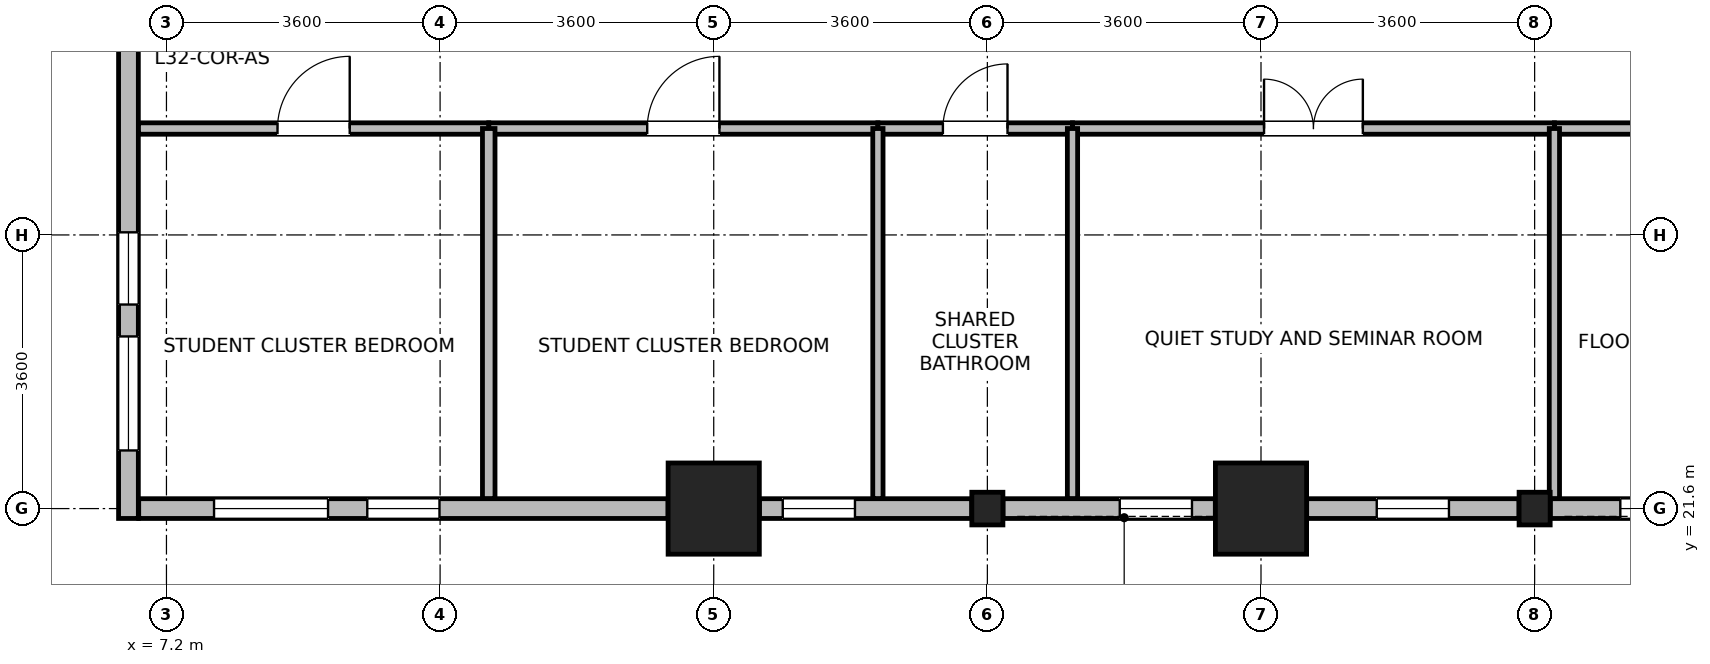
"""IFC4 building model, lengths in metres.
Left out: names, types, materials, properties, quantities, classifications, styles, units other than length and angle.
Written with IfcOpenShell. Run it as: python <this file> out.ifc"""

import sys

from ifc_helpers import new_model, si_unit, direction, frame, frame_2d, origin, origin_2d, place, context, subcontext, project, spatial, rectangle, i_section, extrude, source, transform, mapped, element, fill, save


model = new_model("IFC4")
c1 = context("Model", 3, precision=1e-05, world=origin(), true_north=direction((0.0, 1.0)))
c2 = subcontext(c1, "Body", "Model", "MODEL_VIEW")
j1 = project(units=[si_unit("LENGTHUNIT", "METRE"), si_unit("PLANEANGLEUNIT", "RADIAN")], contexts=[c1])
p1 = place(None, origin())
s1 = spatial("IfcSite", under=j1, at=p1, CompositionType="ELEMENT")
p2 = place(p1, origin())
s2 = spatial("IfcBuilding", under=s1, at=p2, CompositionType="ELEMENT")
p3 = place(p2, frame((0.0, 0.0, 126.7)))
s3 = spatial("IfcBuildingStorey", under=s2, at=p3, CompositionType="ELEMENT", Elevation=126.7)
m1 = source(origin(), c2, "Body", "SweptSolid", [
    extrude(rectangle(XDim=1.2, YDim=1.2, at=origin_2d()), origin(), (0.0, 0.0, 1.0), 3.7),
])
for number, where, z_axis, x_axis in (
    (1, (14.4, 21.6, 0.0), (0.0, 0.0, 1.0), (1.0, 0.0, 0.0)),
    (2, (21.6, 21.6, 0.0), (0.0, 0.0, 1.0), (1.0, 0.0, 0.0)),
):
    element("IfcColumn", number, at=place(p3, frame(where, z_axis=z_axis, x_axis=x_axis)), inside=s3, PredefinedType="COLUMN", context=c2, shape_type="MappedRepresentation", body=[
        mapped(m1, transform((0.0, 0.0, 0.0), x_axis=(1.0, 0.0, 0.0), y_axis=(0.0, 1.0, 0.0), z_axis=(0.0, 0.0, 1.0), scale=1.0)),
    ])
m2 = source(origin(), c2, "Body", "SweptSolid", [
    extrude(i_section(OverallWidth=0.409, OverallDepth=0.43, WebThickness=0.024, FlangeThickness=0.033, FilletRadius=0.015, at=origin_2d()), origin(), (0.0, 0.0, 1.0), 3.7),
])
for number, where, z_axis, x_axis in (
    (3, (18.0, 21.6, 0.0), (0.0, 0.0, 1.0), (1.0, 0.0, 0.0)),
    (4, (25.2, 21.6, 0.0), (0.0, 0.0, 1.0), (1.0, 0.0, 0.0)),
):
    element("IfcColumn", number, at=place(p3, frame(where, z_axis=z_axis, x_axis=x_axis)), inside=s3, PredefinedType="COLUMN", context=c2, shape_type="MappedRepresentation", body=[
        mapped(m2, transform((0.0, 0.0, 0.0), x_axis=(1.0, 0.0, 0.0), y_axis=(0.0, 1.0, 0.0), z_axis=(0.0, 0.0, 1.0), scale=1.0)),
    ])
p4 = place(p3, frame((6.7, 21.47, 0.0), z_axis=(0.0, 0.0, 1.0), x_axis=(0.0, 1.0, 0.0)))
e5 = element("IfcWall", 5, at=p4, inside=s3, PredefinedType="STANDARD", context=c2, shape_type="SweptSolid", body=[
    extrude(rectangle(XDim=6.579, YDim=0.26, at=frame_2d((3.29, 0.0))), origin(), (0.0, 0.0, 1.0), 3.32),
])
p5 = place(p4, frame((0.895, 0.0, 0.85)))
e6 = element("IfcOpeningElement", 6, at=p5, cuts=e5, PredefinedType="OPENING", context=c2, shape_type="SweptSolid", body=[
    extrude(rectangle(XDim=1.5, YDim=1.85, at=frame_2d((0.75, 0.925))), frame((0.0, 0.14, 0.0), z_axis=(0.0, -1.0, 0.0), x_axis=(1.0, 0.0, 0.0)), (0.0, 0.0, 1.0), 0.28),
])
p6 = place(p4, frame((2.814, 0.0, 0.85)))
e7 = element("IfcOpeningElement", 7, at=p6, cuts=e5, PredefinedType="OPENING", context=c2, shape_type="SweptSolid", body=[
    extrude(rectangle(XDim=0.95, YDim=1.75, at=frame_2d((0.475, 0.875))), frame((0.0, 0.14, 0.0), z_axis=(0.0, -1.0, 0.0), x_axis=(1.0, 0.0, 0.0)), (0.0, 0.0, 1.0), 0.28),
])
p7 = place(p3, frame((13.799, 21.6, 0.0), z_axis=(0.0, 0.0, 1.0), x_axis=(-1.0, 0.0, 0.0)))
e8 = element("IfcWall", 8, at=p7, inside=s3, PredefinedType="STANDARD", context=c2, shape_type="SweptSolid", body=[
    extrude(rectangle(XDim=6.964, YDim=0.26, at=frame_2d((3.482, 0.0))), origin(), (0.0, 0.0, 1.0), 3.32),
])
p8 = place(p7, frame((4.473, 0.0, 0.85)))
e9 = element("IfcOpeningElement", 9, at=p8, cuts=e8, PredefinedType="OPENING", context=c2, shape_type="SweptSolid", body=[
    extrude(rectangle(XDim=1.5, YDim=1.85, at=frame_2d((0.75, 0.925))), frame((0.0, 0.14, 0.0), z_axis=(0.0, -1.0, 0.0), x_axis=(1.0, 0.0, 0.0)), (0.0, 0.0, 1.0), 0.28),
])
p9 = place(p7, frame((3.007, 0.0, 0.85)))
e10 = element("IfcOpeningElement", 10, at=p9, cuts=e8, PredefinedType="OPENING", context=c2, shape_type="SweptSolid", body=[
    extrude(rectangle(XDim=0.95, YDim=1.75, at=frame_2d((0.475, 0.875))), frame((0.0, 0.14, 0.0), z_axis=(0.0, -1.0, 0.0), x_axis=(1.0, 0.0, 0.0)), (0.0, 0.0, 1.0), 0.28),
])
p10 = place(p3, frame((17.794, 21.6, 0.0), z_axis=(0.0, 0.0, 1.0), x_axis=(-1.0, 0.0, 0.0)))
e11 = element("IfcWall", 11, at=p10, inside=s3, PredefinedType="STANDARD", context=c2, shape_type="SweptSolid", body=[
    extrude(rectangle(XDim=2.793, YDim=0.26, at=frame_2d((1.397, 0.0))), origin(), (0.0, 0.0, 1.0), 2.87),
])
p11 = place(p10, frame((1.536, 0.0, 0.85)))
e12 = element("IfcOpeningElement", 12, at=p11, cuts=e11, PredefinedType="OPENING", context=c2, shape_type="SweptSolid", body=[
    extrude(rectangle(XDim=0.95, YDim=1.75, at=frame_2d((0.475, 0.875))), frame((0.0, 0.14, 0.0), z_axis=(0.0, -1.0, 0.0), x_axis=(1.0, 0.0, 0.0)), (0.0, 0.0, 1.0), 0.28),
])
p12 = place(p3, frame((20.999, 21.6, 0.0), z_axis=(0.0, 0.0, 1.0), x_axis=(-1.0, 0.0, 0.0)))
e13 = element("IfcWall", 13, at=p12, inside=s3, PredefinedType="STANDARD", context=c2, shape_type="SweptSolid", body=[
    extrude(rectangle(XDim=2.793, YDim=0.26, at=frame_2d((1.397, 0.0))), origin(), (0.0, 0.0, 1.0), 2.87),
])
p13 = place(p12, frame((0.307, 0.0, 0.85)))
e14 = element("IfcOpeningElement", 14, at=p13, cuts=e13, PredefinedType="OPENING", context=c2, shape_type="SweptSolid", body=[
    extrude(rectangle(XDim=0.95, YDim=1.75, at=frame_2d((0.475, 0.875))), frame((0.0, 0.14, 0.0), z_axis=(0.0, -1.0, 0.0), x_axis=(1.0, 0.0, 0.0)), (0.0, 0.0, 1.0), 0.28),
])
p14 = place(p3, frame((24.994, 21.6, 0.0), z_axis=(0.0, 0.0, 1.0), x_axis=(-1.0, 0.0, 0.0)))
e15 = element("IfcWall", 15, at=p14, inside=s3, PredefinedType="STANDARD", context=c2, shape_type="SweptSolid", body=[
    extrude(rectangle(XDim=2.793, YDim=0.26, at=frame_2d((1.397, 0.0))), origin(), (0.0, 0.0, 1.0), 2.87),
])
p15 = place(p14, frame((0.922, 0.0, 0.85)))
e16 = element("IfcOpeningElement", 16, at=p15, cuts=e15, PredefinedType="OPENING", context=c2, shape_type="SweptSolid", body=[
    extrude(rectangle(XDim=0.95, YDim=1.75, at=frame_2d((0.475, 0.875))), frame((0.0, 0.14, 0.0), z_axis=(0.0, -1.0, 0.0), x_axis=(1.0, 0.0, 0.0)), (0.0, 0.0, 1.0), 0.28),
])
p16 = place(p3, frame((28.199, 21.6, 0.0), z_axis=(0.0, 0.0, 1.0), x_axis=(-1.0, 0.0, 0.0)))
e17 = element("IfcWall", 17, at=p16, inside=s3, PredefinedType="STANDARD", context=c2, shape_type="SweptSolid", body=[
    extrude(rectangle(XDim=2.793, YDim=0.26, at=frame_2d((1.397, 0.0))), origin(), (0.0, 0.0, 1.0), 2.87),
])
p17 = place(p16, frame((0.922, 0.0, 0.85)))
e18 = element("IfcOpeningElement", 18, at=p17, cuts=e17, PredefinedType="OPENING", context=c2, shape_type="SweptSolid", body=[
    extrude(rectangle(XDim=0.95, YDim=1.75, at=frame_2d((0.475, 0.875))), frame((0.0, 0.14, 0.0), z_axis=(0.0, -1.0, 0.0), x_axis=(1.0, 0.0, 0.0)), (0.0, 0.0, 1.0), 0.28),
])
p18 = place(p3, frame((19.12, 26.6, 0.0), z_axis=(0.0, 0.0, 1.0), x_axis=(1.0, 0.0, 0.0)))
e19 = element("IfcWall", 19, at=p18, inside=s3, PredefinedType="PARTITIONING", context=c2, shape_type="SweptSolid", body=[
    extrude(rectangle(XDim=6.34, YDim=0.15, at=frame_2d((3.17, 0.0))), origin(), (0.0, 0.0, 1.0), 3.32),
])
p19 = place(p18, frame((2.52, 0.0, 0.0)))
e20 = element("IfcOpeningElement", 20, at=p19, cuts=e19, PredefinedType="OPENING", context=c2, shape_type="SweptSolid", body=[
    extrude(rectangle(XDim=1.3, YDim=2.12, at=frame_2d((0.65, 1.06))), frame((0.0, 0.085, 0.0), z_axis=(0.0, -1.0, 0.0), x_axis=(1.0, 0.0, 0.0)), (0.0, 0.0, 1.0), 0.17),
])
p20 = place(p3, frame((11.44, 26.6, 0.0), z_axis=(0.0, 0.0, 1.0), x_axis=(1.0, 0.0, 0.0)))
e21 = element("IfcWall", 21, at=p20, inside=s3, PredefinedType="PARTITIONING", context=c2, shape_type="SweptSolid", body=[
    extrude(rectangle(XDim=5.12, YDim=0.15, at=frame_2d((2.56, 0.0))), origin(), (0.0, 0.0, 1.0), 3.32),
])
p21 = place(p20, frame((2.085, 0.0, 0.0)))
e22 = element("IfcOpeningElement", 22, at=p21, cuts=e21, PredefinedType="OPENING", context=c2, shape_type="SweptSolid", body=[
    extrude(rectangle(XDim=0.95, YDim=2.1, at=frame_2d((0.475, 1.05))), frame((0.0, 0.085, 0.0), z_axis=(0.0, -1.0, 0.0), x_axis=(1.0, 0.0, 0.0)), (0.0, 0.0, 1.0), 0.17),
])
p22 = place(p3, frame((25.46, 26.6, 0.0), z_axis=(0.0, 0.0, 1.0), x_axis=(1.0, 0.0, 0.0)))
e23 = element("IfcWall", 23, at=p22, inside=s3, PredefinedType="PARTITIONING", context=c2, shape_type="SweptSolid", body=[
    extrude(rectangle(XDim=4.98, YDim=0.15, at=frame_2d((2.49, 0.0))), origin(), (0.0, 0.0, 1.0), 3.32),
])
p23 = place(p22, frame((2.065, 0.0, 0.0)))
e24 = element("IfcOpeningElement", 24, at=p23, cuts=e23, PredefinedType="OPENING", context=c2, shape_type="SweptSolid", body=[
    extrude(rectangle(XDim=0.85, YDim=2.04, at=frame_2d((0.425, 1.02))), frame((0.0, 0.085, 0.0), z_axis=(0.0, -1.0, 0.0), x_axis=(1.0, 0.0, 0.0)), (0.0, 0.0, 1.0), 0.17),
])
p24 = place(p3, frame((6.832, 26.6, 0.0), z_axis=(0.0, 0.0, 1.0), x_axis=(1.0, 0.0, 0.0)))
e25 = element("IfcWall", 25, at=p24, inside=s3, PredefinedType="PARTITIONING", context=c2, shape_type="SweptSolid", body=[
    extrude(rectangle(XDim=4.608, YDim=0.15, at=frame_2d((2.304, 0.0))), origin(), (0.0, 0.0, 1.0), 3.32),
])
p25 = place(p24, frame((1.829, 0.0, 0.0)))
e26 = element("IfcOpeningElement", 26, at=p25, cuts=e25, PredefinedType="OPENING", context=c2, shape_type="SweptSolid", body=[
    extrude(rectangle(XDim=0.95, YDim=2.1, at=frame_2d((0.475, 1.05))), frame((0.0, 0.085, 0.0), z_axis=(0.0, -1.0, 0.0), x_axis=(1.0, 0.0, 0.0)), (0.0, 0.0, 1.0), 0.17),
])
p26 = place(p3, frame((16.56, 26.6, 0.0), z_axis=(0.0, 0.0, 1.0), x_axis=(1.0, 0.0, 0.0)))
e27 = element("IfcWall", 27, at=p26, inside=s3, PredefinedType="PARTITIONING", context=c2, shape_type="SweptSolid", body=[
    extrude(rectangle(XDim=2.56, YDim=0.15, at=frame_2d((1.28, 0.0))), origin(), (0.0, 0.0, 1.0), 3.32),
])
p27 = place(p26, frame((0.855, 0.0, 0.0)))
e28 = element("IfcOpeningElement", 28, at=p27, cuts=e27, PredefinedType="OPENING", context=c2, shape_type="SweptSolid", body=[
    extrude(rectangle(XDim=0.85, YDim=2.04, at=frame_2d((0.425, 1.02))), frame((0.0, 0.085, 0.0), z_axis=(0.0, -1.0, 0.0), x_axis=(1.0, 0.0, 0.0)), (0.0, 0.0, 1.0), 0.17),
])
p28 = place(p3, frame((11.44, 21.732, 0.0), z_axis=(0.0, 0.0, 1.0), x_axis=(0.0, 1.0, 0.0)))
e29 = element("IfcWall", 29, at=p28, inside=s3, PredefinedType="PARTITIONING", context=c2, shape_type="SweptSolid", body=[
    extrude(rectangle(XDim=4.868, YDim=0.165, at=frame_2d((2.434, 0.0))), origin(), (0.0, 0.0, 1.0), 3.32),
])
for number, where, z_axis, x_axis in (
    (30, (16.56, 21.732, 0.0), (0.0, 0.0, 1.0), (0.0, 1.0, 0.0)),
    (31, (19.12, 21.732, 0.0), (0.0, 0.0, 1.0), (0.0, 1.0, 0.0)),
    (32, (25.46, 21.732, 0.0), (0.0, 0.0, 1.0), (0.0, 1.0, 0.0)),
):
    element("IfcWall", number, at=place(p3, frame(where, z_axis=z_axis, x_axis=x_axis)), inside=s3, PredefinedType="PARTITIONING", context=c2, shape_type="SweptSolid", body=[
        extrude(rectangle(XDim=4.868, YDim=0.135, at=frame_2d((2.434, 0.0))), origin(), (0.0, 0.0, 1.0), 3.32),
    ])
p29 = place(p5, origin())
e33 = element("IfcWindow", 33, at=p29, inside=s3, PartitioningType="SINGLE_PANEL", PredefinedType="WINDOW", context=c2, shape_type="SweptSolid", body=[
    extrude(rectangle(XDim=1.5, YDim=1.85, at=frame_2d((0.75, 0.925))), frame((0.0, 0.03, 0.0), z_axis=(0.0, -1.0, 0.0), x_axis=(1.0, 0.0, 0.0)), (0.0, 0.0, 1.0), 0.06),
])
fill(e6, e33)
p30 = place(p6, origin())
e34 = element("IfcWindow", 34, at=p30, inside=s3, PartitioningType="SINGLE_PANEL", PredefinedType="WINDOW", context=c2, shape_type="SweptSolid", body=[
    extrude(rectangle(XDim=0.95, YDim=1.75, at=frame_2d((0.475, 0.875))), frame((0.0, 0.03, 0.0), z_axis=(0.0, -1.0, 0.0), x_axis=(1.0, 0.0, 0.0)), (0.0, 0.0, 1.0), 0.06),
])
fill(e7, e34)
p31 = place(p8, origin())
e35 = element("IfcWindow", 35, at=p31, inside=s3, PartitioningType="SINGLE_PANEL", PredefinedType="WINDOW", context=c2, shape_type="SweptSolid", body=[
    extrude(rectangle(XDim=1.5, YDim=1.85, at=frame_2d((0.75, 0.925))), frame((0.0, 0.03, 0.0), z_axis=(0.0, -1.0, 0.0), x_axis=(1.0, 0.0, 0.0)), (0.0, 0.0, 1.0), 0.06),
])
fill(e9, e35)
p32 = place(p9, origin())
e36 = element("IfcWindow", 36, at=p32, inside=s3, PartitioningType="SINGLE_PANEL", PredefinedType="WINDOW", context=c2, shape_type="SweptSolid", body=[
    extrude(rectangle(XDim=0.95, YDim=1.75, at=frame_2d((0.475, 0.875))), frame((0.0, 0.03, 0.0), z_axis=(0.0, -1.0, 0.0), x_axis=(1.0, 0.0, 0.0)), (0.0, 0.0, 1.0), 0.06),
])
fill(e10, e36)
p33 = place(p11, origin())
e37 = element("IfcWindow", 37, at=p33, inside=s3, PartitioningType="SINGLE_PANEL", PredefinedType="WINDOW", context=c2, shape_type="SweptSolid", body=[
    extrude(rectangle(XDim=0.95, YDim=1.75, at=frame_2d((0.475, 0.875))), frame((0.0, 0.03, 0.0), z_axis=(0.0, -1.0, 0.0), x_axis=(1.0, 0.0, 0.0)), (0.0, 0.0, 1.0), 0.06),
])
fill(e12, e37)
p34 = place(p13, origin())
e38 = element("IfcWindow", 38, at=p34, inside=s3, PartitioningType="SINGLE_PANEL", PredefinedType="WINDOW", context=c2, shape_type="SweptSolid", body=[
    extrude(rectangle(XDim=0.95, YDim=1.75, at=frame_2d((0.475, 0.875))), frame((0.0, 0.03, 0.0), z_axis=(0.0, -1.0, 0.0), x_axis=(1.0, 0.0, 0.0)), (0.0, 0.0, 1.0), 0.06),
])
fill(e14, e38)
p35 = place(p15, origin())
e39 = element("IfcWindow", 39, at=p35, inside=s3, PartitioningType="SINGLE_PANEL", PredefinedType="WINDOW", context=c2, shape_type="SweptSolid", body=[
    extrude(rectangle(XDim=0.95, YDim=1.75, at=frame_2d((0.475, 0.875))), frame((0.0, 0.03, 0.0), z_axis=(0.0, -1.0, 0.0), x_axis=(1.0, 0.0, 0.0)), (0.0, 0.0, 1.0), 0.06),
])
fill(e16, e39)
p36 = place(p17, origin())
e40 = element("IfcWindow", 40, at=p36, inside=s3, PartitioningType="SINGLE_PANEL", PredefinedType="WINDOW", context=c2, shape_type="SweptSolid", body=[
    extrude(rectangle(XDim=0.95, YDim=1.75, at=frame_2d((0.475, 0.875))), frame((0.0, 0.03, 0.0), z_axis=(0.0, -1.0, 0.0), x_axis=(1.0, 0.0, 0.0)), (0.0, 0.0, 1.0), 0.06),
])
fill(e18, e40)
p37 = place(p19, origin())
e41 = element("IfcDoor", 41, at=p37, inside=s3, OperationType="DOUBLE_DOOR_SINGLE_SWING", PredefinedType="DOOR", context=c2, shape_type="SweptSolid", body=[
    extrude(rectangle(XDim=1.3, YDim=2.12, at=frame_2d((0.65, 1.06))), frame((0.0, 0.025, 0.0), z_axis=(0.0, -1.0, 0.0), x_axis=(1.0, 0.0, 0.0)), (0.0, 0.0, 1.0), 0.05),
])
fill(e20, e41)
p38 = place(p21, origin())
e42 = element("IfcDoor", 42, at=p38, inside=s3, OperationType="SINGLE_SWING_RIGHT", PredefinedType="DOOR", context=c2, shape_type="SweptSolid", body=[
    extrude(rectangle(XDim=0.95, YDim=2.1, at=frame_2d((0.475, 1.05))), frame((0.0, 0.025, 0.0), z_axis=(0.0, -1.0, 0.0), x_axis=(1.0, 0.0, 0.0)), (0.0, 0.0, 1.0), 0.05),
])
fill(e22, e42)
p39 = place(p25, origin())
e43 = element("IfcDoor", 43, at=p39, inside=s3, OperationType="SINGLE_SWING_RIGHT", PredefinedType="DOOR", context=c2, shape_type="SweptSolid", body=[
    extrude(rectangle(XDim=0.95, YDim=2.1, at=frame_2d((0.475, 1.05))), frame((0.0, 0.025, 0.0), z_axis=(0.0, -1.0, 0.0), x_axis=(1.0, 0.0, 0.0)), (0.0, 0.0, 1.0), 0.05),
])
fill(e26, e43)
p40 = place(p27, origin())
e44 = element("IfcDoor", 44, at=p40, inside=s3, OperationType="SINGLE_SWING_RIGHT", PredefinedType="DOOR", context=c2, shape_type="SweptSolid", body=[
    extrude(rectangle(XDim=0.85, YDim=2.04, at=frame_2d((0.425, 1.02))), frame((0.0, 0.025, 0.0), z_axis=(0.0, -1.0, 0.0), x_axis=(1.0, 0.0, 0.0)), (0.0, 0.0, 1.0), 0.05),
])
fill(e28, e44)
save(model, sys.argv[1])
